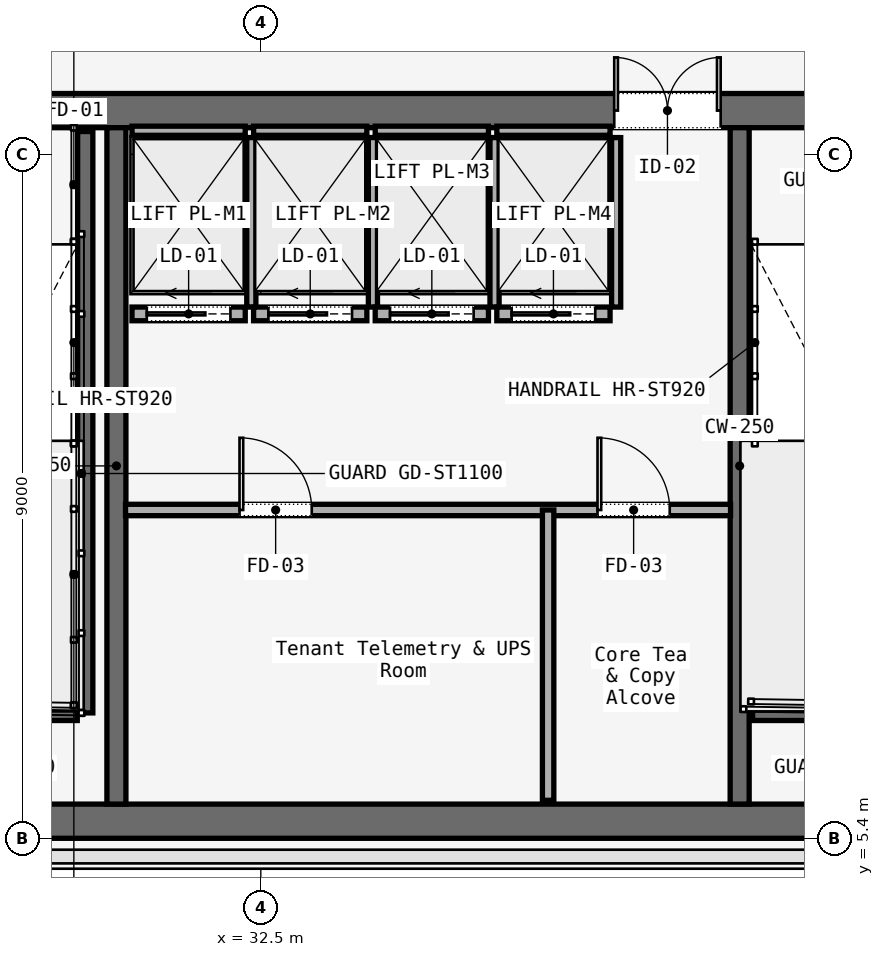
"""IFC4 building model, lengths in metres.
Left out: names, types, materials, properties, quantities, classifications, styles, units other than length and angle.
Written with IfcOpenShell. Run it as: python <this file> out.ifc"""

import sys

from ifc_helpers import new_model, si_unit, direction, frame, frame_2d, origin, place, context, subcontext, project, spatial, rectangle, extrude, element, fill, save


model = new_model("IFC4")
c1 = context("Model", 3, precision=1e-05, world=origin(), true_north=direction((0.0, 1.0)))
c2 = subcontext(c1, "Body", "Model", "MODEL_VIEW")
j1 = project(units=[si_unit("LENGTHUNIT", "METRE"), si_unit("PLANEANGLEUNIT", "RADIAN")], contexts=[c1])
p1 = place(None, origin())
s1 = spatial("IfcSite", under=j1, at=p1, CompositionType="ELEMENT")
p2 = place(p1, origin())
s2 = spatial("IfcBuilding", under=s1, at=p2, CompositionType="ELEMENT")
p3 = place(p2, frame((0.0, 0.0, 149.8)))
s3 = spatial("IfcBuildingStorey", under=s2, at=p3, CompositionType="ELEMENT", Elevation=149.8)
p4 = place(p3, frame((26.45, 14.975, 0.0), z_axis=(0.0, 0.0, 1.0), x_axis=(1.0, 0.0, 0.0)))
e1 = element("IfcWall", 1, at=p4, inside=s3, PredefinedType="SOLIDWALL", context=c2, shape_type="SweptSolid", body=[
    extrude(rectangle(XDim=31.1, YDim=0.45, at=frame_2d((15.55, 0.0))), origin(), (0.0, 0.0, 1.0), 3.58),
])
p5 = place(p4, frame((1.65, 0.0, 0.0)))
e2 = element("IfcOpeningElement", 2, at=p5, cuts=e1, PredefinedType="OPENING", context=c2, shape_type="SweptSolid", body=[
    extrude(rectangle(XDim=1.1, YDim=2.2, at=frame_2d((0.55, 1.1))), frame((0.0, 0.225, 0.0), z_axis=(0.0, -1.0, 0.0), x_axis=(1.0, 0.0, 0.0)), (0.0, 0.0, 1.0), 0.45),
])
p6 = place(p4, frame((13.65, 0.0, 0.0)))
e3 = element("IfcOpeningElement", 3, at=p6, cuts=e1, PredefinedType="OPENING", context=c2, shape_type="SweptSolid", body=[
    extrude(rectangle(XDim=1.1, YDim=2.2, at=frame_2d((0.55, 1.1))), frame((0.0, 0.225, 0.0), z_axis=(0.0, -1.0, 0.0), x_axis=(1.0, 0.0, 0.0)), (0.0, 0.0, 1.0), 0.45),
])
p7 = place(p4, frame((25.55, 0.0, 0.0)))
e4 = element("IfcOpeningElement", 4, at=p7, cuts=e1, PredefinedType="OPENING", context=c2, shape_type="SweptSolid", body=[
    extrude(rectangle(XDim=1.1, YDim=2.2, at=frame_2d((0.55, 1.1))), frame((0.0, 0.225, 0.0), z_axis=(0.0, -1.0, 0.0), x_axis=(1.0, 0.0, 0.0)), (0.0, 0.0, 1.0), 0.45),
])
p8 = place(p4, frame((10.7, 0.0, 0.0)))
e5 = element("IfcOpeningElement", 5, at=p8, cuts=e1, PredefinedType="OPENING", context=c2, shape_type="SweptSolid", body=[
    extrude(rectangle(XDim=1.4, YDim=2.2, at=frame_2d((0.7, 1.1))), frame((0.0, 0.225, 0.0), z_axis=(0.0, -1.0, 0.0), x_axis=(1.0, 0.0, 0.0)), (0.0, 0.0, 1.0), 0.45),
])
p9 = place(p4, frame((19.35, 0.0, 0.0)))
e6 = element("IfcOpeningElement", 6, at=p9, cuts=e1, PredefinedType="OPENING", context=c2, shape_type="SweptSolid", body=[
    extrude(rectangle(XDim=1.1, YDim=2.2, at=frame_2d((0.55, 1.1))), frame((0.0, 0.225, 0.0), z_axis=(0.0, -1.0, 0.0), x_axis=(1.0, 0.0, 0.0)), (0.0, 0.0, 1.0), 0.45),
])
p10 = place(p4, frame((21.4, 0.0, 0.0)))
e7 = element("IfcOpeningElement", 7, at=p10, cuts=e1, PredefinedType="OPENING", context=c2, shape_type="SweptSolid", body=[
    extrude(rectangle(XDim=0.9, YDim=2.1, at=frame_2d((0.45, 1.05))), frame((0.0, 0.225, 0.0), z_axis=(0.0, -1.0, 0.0), x_axis=(1.0, 0.0, 0.0)), (0.0, 0.0, 1.0), 0.45),
])
p11 = place(p4, frame((23.35, 0.0, 0.0)))
e8 = element("IfcOpeningElement", 8, at=p11, cuts=e1, PredefinedType="OPENING", context=c2, shape_type="SweptSolid", body=[
    extrude(rectangle(XDim=1.3, YDim=2.3, at=frame_2d((0.65, 1.15))), frame((0.0, 0.225, 0.0), z_axis=(0.0, -1.0, 0.0), x_axis=(1.0, 0.0, 0.0)), (0.0, 0.0, 1.0), 0.45),
])
p12 = place(p3, frame((26.45, 5.625, 0.0), z_axis=(0.0, 0.0, 1.0), x_axis=(1.0, 0.0, 0.0)))
e9 = element("IfcWall", 9, at=p12, inside=s3, PredefinedType="SOLIDWALL", context=c2, shape_type="SweptSolid", body=[
    extrude(rectangle(XDim=31.1, YDim=0.45, at=frame_2d((15.55, 0.0))), origin(), (0.0, 0.0, 1.0), 3.58),
])
for number, where, z_axis, x_axis in (
    (10, (30.6, 5.85, 0.0), (0.0, 0.0, 1.0), (0.0, 1.0, 0.0)),
    (11, (38.8, 5.85, 0.0), (0.0, 0.0, 1.0), (0.0, 1.0, 0.0)),
):
    element("IfcWall", number, at=place(p3, frame(where, z_axis=z_axis, x_axis=x_axis)), inside=s3, PredefinedType="SOLIDWALL", context=c2, shape_type="SweptSolid", body=[
        extrude(rectangle(XDim=8.9, YDim=0.25, at=frame_2d((4.45, 0.0))), origin(), (0.0, 0.0, 1.0), 3.58),
    ])
p13 = place(p3, frame((30.19, 14.7, 0.0), z_axis=(0.0, 0.0, 1.0), x_axis=(0.0, -1.0, 0.0)))
e12 = element("IfcWall", 12, at=p13, inside=s3, PredefinedType="SOLIDWALL", context=c2, shape_type="SweptSolid", body=[
    extrude(rectangle(XDim=7.65, YDim=0.2, at=frame_2d((3.825, 0.0))), origin(), (0.0, 0.0, 1.0), 3.8),
])
for number, where, z_axis, x_axis in (
    (13, (26.97, 7.05, 0.0), (0.0, 0.0, 1.0), (1.0, 0.0, 0.0)),
    (14, (38.97, 7.05, 0.0), (0.0, 0.0, 1.0), (1.0, 0.0, 0.0)),
):
    element("IfcWall", number, at=place(p3, frame(where, z_axis=z_axis, x_axis=x_axis)), inside=s3, PredefinedType="SOLIDWALL", context=c2, shape_type="SweptSolid", body=[
        extrude(rectangle(XDim=3.115, YDim=0.2, at=frame_2d((1.558, 0.0))), origin(), (0.0, 0.0, 1.0), 3.8),
    ])
p14 = place(p3, frame((30.72, 9.72, 0.0), z_axis=(0.0, 0.0, 1.0), x_axis=(1.0, 0.0, 0.0)))
e15 = element("IfcWall", 15, at=p14, inside=s3, PredefinedType="PARTITIONING", context=c2, shape_type="SweptSolid", body=[
    extrude(rectangle(XDim=7.96, YDim=0.15, at=frame_2d((3.98, 0.0))), origin(), (0.0, 0.0, 1.0), 3.01),
])
p15 = place(p14, frame((1.5, 0.0, 0.0)))
e16 = element("IfcOpeningElement", 16, at=p15, cuts=e15, PredefinedType="OPENING", context=c2, shape_type="SweptSolid", body=[
    extrude(rectangle(XDim=0.95, YDim=2.2, at=frame_2d((0.475, 1.1))), frame((0.0, 0.075, 0.0), z_axis=(0.0, -1.0, 0.0), x_axis=(1.0, 0.0, 0.0)), (0.0, 0.0, 1.0), 0.15),
])
p16 = place(p14, frame((6.21, 0.0, 0.0)))
e17 = element("IfcOpeningElement", 17, at=p16, cuts=e15, PredefinedType="OPENING", context=c2, shape_type="SweptSolid", body=[
    extrude(rectangle(XDim=0.95, YDim=2.2, at=frame_2d((0.475, 1.1))), frame((0.0, 0.075, 0.0), z_axis=(0.0, -1.0, 0.0), x_axis=(1.0, 0.0, 0.0)), (0.0, 0.0, 1.0), 0.15),
])
p17 = place(p3, frame((36.28, 5.9, 0.0), z_axis=(0.0, 0.0, 1.0), x_axis=(0.0, 1.0, 0.0)))
e18 = element("IfcWall", 18, at=p17, inside=s3, PredefinedType="PARTITIONING", context=c2, shape_type="SweptSolid", body=[
    extrude(rectangle(XDim=3.82, YDim=0.15, at=frame_2d((1.91, 0.0))), origin(), (0.0, 0.0, 1.0), 3.01),
])
p18 = place(p3, frame((30.805, 12.3, 0.0), z_axis=(0.0, 0.0, 1.0), x_axis=(1.0, 0.0, 0.0)))
e19 = element("IfcWall", 19, at=p18, inside=s3, PredefinedType="SOLIDWALL", context=c2, shape_type="SweptSolid", body=[
    extrude(rectangle(XDim=1.49, YDim=0.18, at=frame_2d((0.745, 0.0))), origin(), (0.0, 0.0, 1.0), 3.01),
])
p19 = place(p18, frame((0.195, 0.0, 0.0)))
e20 = element("IfcOpeningElement", 20, at=p19, cuts=e19, PredefinedType="OPENING", context=c2, shape_type="SweptSolid", body=[
    extrude(rectangle(XDim=1.1, YDim=2.2, at=frame_2d((0.55, 1.1))), frame((0.0, 0.09, 0.0), z_axis=(0.0, -1.0, 0.0), x_axis=(1.0, 0.0, 0.0)), (0.0, 0.0, 1.0), 0.18),
])
p20 = place(p3, frame((30.805, 14.71, 0.0), z_axis=(0.0, 0.0, 1.0), x_axis=(1.0, 0.0, 0.0)))
e21 = element("IfcWall", 21, at=p20, inside=s3, PredefinedType="SOLIDWALL", context=c2, shape_type="SweptSolid", body=[
    extrude(rectangle(XDim=1.49, YDim=0.12, at=frame_2d((0.745, 0.0))), origin(), (0.0, 0.0, 1.0), 3.01),
])
p21 = place(p3, frame((32.375, 12.39, 0.0), z_axis=(0.0, 0.0, 1.0), x_axis=(0.0, 1.0, 0.0)))
e22 = element("IfcWall", 22, at=p21, inside=s3, PredefinedType="SOLIDWALL", context=c2, shape_type="SweptSolid", body=[
    extrude(rectangle(XDim=2.23, YDim=0.12, at=frame_2d((1.115, 0.0))), origin(), (0.0, 0.0, 1.0), 3.01),
])
p22 = place(p3, frame((32.405, 12.3, 0.0), z_axis=(0.0, 0.0, 1.0), x_axis=(1.0, 0.0, 0.0)))
e23 = element("IfcWall", 23, at=p22, inside=s3, PredefinedType="SOLIDWALL", context=c2, shape_type="SweptSolid", body=[
    extrude(rectangle(XDim=1.49, YDim=0.18, at=frame_2d((0.745, 0.0))), origin(), (0.0, 0.0, 1.0), 3.01),
])
p23 = place(p22, frame((0.195, 0.0, 0.0)))
e24 = element("IfcOpeningElement", 24, at=p23, cuts=e23, PredefinedType="OPENING", context=c2, shape_type="SweptSolid", body=[
    extrude(rectangle(XDim=1.1, YDim=2.2, at=frame_2d((0.55, 1.1))), frame((0.0, 0.09, 0.0), z_axis=(0.0, -1.0, 0.0), x_axis=(1.0, 0.0, 0.0)), (0.0, 0.0, 1.0), 0.18),
])
p24 = place(p3, frame((32.405, 14.71, 0.0), z_axis=(0.0, 0.0, 1.0), x_axis=(1.0, 0.0, 0.0)))
e25 = element("IfcWall", 25, at=p24, inside=s3, PredefinedType="SOLIDWALL", context=c2, shape_type="SweptSolid", body=[
    extrude(rectangle(XDim=1.49, YDim=0.12, at=frame_2d((0.745, 0.0))), origin(), (0.0, 0.0, 1.0), 3.01),
])
p25 = place(p3, frame((33.975, 12.39, 0.0), z_axis=(0.0, 0.0, 1.0), x_axis=(0.0, 1.0, 0.0)))
e26 = element("IfcWall", 26, at=p25, inside=s3, PredefinedType="SOLIDWALL", context=c2, shape_type="SweptSolid", body=[
    extrude(rectangle(XDim=2.23, YDim=0.12, at=frame_2d((1.115, 0.0))), origin(), (0.0, 0.0, 1.0), 3.01),
])
p26 = place(p3, frame((34.005, 12.3, 0.0), z_axis=(0.0, 0.0, 1.0), x_axis=(1.0, 0.0, 0.0)))
e27 = element("IfcWall", 27, at=p26, inside=s3, PredefinedType="SOLIDWALL", context=c2, shape_type="SweptSolid", body=[
    extrude(rectangle(XDim=1.49, YDim=0.18, at=frame_2d((0.745, 0.0))), origin(), (0.0, 0.0, 1.0), 3.01),
])
p27 = place(p26, frame((0.195, 0.0, 0.0)))
e28 = element("IfcOpeningElement", 28, at=p27, cuts=e27, PredefinedType="OPENING", context=c2, shape_type="SweptSolid", body=[
    extrude(rectangle(XDim=1.1, YDim=2.2, at=frame_2d((0.55, 1.1))), frame((0.0, 0.09, 0.0), z_axis=(0.0, -1.0, 0.0), x_axis=(1.0, 0.0, 0.0)), (0.0, 0.0, 1.0), 0.18),
])
p28 = place(p3, frame((34.005, 14.71, 0.0), z_axis=(0.0, 0.0, 1.0), x_axis=(1.0, 0.0, 0.0)))
e29 = element("IfcWall", 29, at=p28, inside=s3, PredefinedType="SOLIDWALL", context=c2, shape_type="SweptSolid", body=[
    extrude(rectangle(XDim=1.49, YDim=0.12, at=frame_2d((0.745, 0.0))), origin(), (0.0, 0.0, 1.0), 3.01),
])
p29 = place(p3, frame((35.575, 12.39, 0.0), z_axis=(0.0, 0.0, 1.0), x_axis=(0.0, 1.0, 0.0)))
e30 = element("IfcWall", 30, at=p29, inside=s3, PredefinedType="SOLIDWALL", context=c2, shape_type="SweptSolid", body=[
    extrude(rectangle(XDim=2.23, YDim=0.12, at=frame_2d((1.115, 0.0))), origin(), (0.0, 0.0, 1.0), 3.01),
])
p30 = place(p3, frame((35.605, 12.3, 0.0), z_axis=(0.0, 0.0, 1.0), x_axis=(1.0, 0.0, 0.0)))
e31 = element("IfcWall", 31, at=p30, inside=s3, PredefinedType="SOLIDWALL", context=c2, shape_type="SweptSolid", body=[
    extrude(rectangle(XDim=1.49, YDim=0.18, at=frame_2d((0.745, 0.0))), origin(), (0.0, 0.0, 1.0), 3.01),
])
p31 = place(p30, frame((0.195, 0.0, 0.0)))
e32 = element("IfcOpeningElement", 32, at=p31, cuts=e31, PredefinedType="OPENING", context=c2, shape_type="SweptSolid", body=[
    extrude(rectangle(XDim=1.1, YDim=2.2, at=frame_2d((0.55, 1.1))), frame((0.0, 0.09, 0.0), z_axis=(0.0, -1.0, 0.0), x_axis=(1.0, 0.0, 0.0)), (0.0, 0.0, 1.0), 0.18),
])
p32 = place(p3, frame((35.605, 14.71, 0.0), z_axis=(0.0, 0.0, 1.0), x_axis=(1.0, 0.0, 0.0)))
e33 = element("IfcWall", 33, at=p32, inside=s3, PredefinedType="SOLIDWALL", context=c2, shape_type="SweptSolid", body=[
    extrude(rectangle(XDim=1.49, YDim=0.12, at=frame_2d((0.745, 0.0))), origin(), (0.0, 0.0, 1.0), 3.01),
])
p33 = place(p3, frame((37.175, 12.39, 0.0), z_axis=(0.0, 0.0, 1.0), x_axis=(0.0, 1.0, 0.0)))
e34 = element("IfcWall", 34, at=p33, inside=s3, PredefinedType="SOLIDWALL", context=c2, shape_type="SweptSolid", body=[
    extrude(rectangle(XDim=2.23, YDim=0.12, at=frame_2d((1.115, 0.0))), origin(), (0.0, 0.0, 1.0), 3.01),
])
p34 = place(p8, origin())
e35 = element("IfcDoor", 35, at=p34, inside=s3, OperationType="DOUBLE_DOOR_SINGLE_SWING", PredefinedType="DOOR", context=c2, shape_type="SweptSolid", body=[
    extrude(rectangle(XDim=1.4, YDim=2.2, at=frame_2d((0.7, 1.1))), frame((0.0, 0.025, 0.0), z_axis=(0.0, -1.0, 0.0), x_axis=(1.0, 0.0, 0.0)), (0.0, 0.0, 1.0), 0.05),
])
fill(e5, e35)
p35 = place(p15, origin())
e36 = element("IfcDoor", 36, at=p35, inside=s3, OperationType="SINGLE_SWING_LEFT", PredefinedType="DOOR", context=c2, shape_type="SweptSolid", body=[
    extrude(rectangle(XDim=0.95, YDim=2.2, at=frame_2d((0.475, 1.1))), frame((0.0, 0.025, 0.0), z_axis=(0.0, -1.0, 0.0), x_axis=(1.0, 0.0, 0.0)), (0.0, 0.0, 1.0), 0.05),
])
fill(e16, e36)
p36 = place(p16, origin())
e37 = element("IfcDoor", 37, at=p36, inside=s3, OperationType="SINGLE_SWING_RIGHT", PredefinedType="DOOR", context=c2, shape_type="SweptSolid", body=[
    extrude(rectangle(XDim=0.95, YDim=2.2, at=frame_2d((0.475, 1.1))), frame((0.0, 0.025, 0.0), z_axis=(0.0, -1.0, 0.0), x_axis=(1.0, 0.0, 0.0)), (0.0, 0.0, 1.0), 0.05),
])
fill(e17, e37)
p37 = place(p19, origin())
e38 = element("IfcDoor", 38, at=p37, inside=s3, OperationType="SLIDING_TO_LEFT", PredefinedType="DOOR", context=c2, shape_type="SweptSolid", body=[
    extrude(rectangle(XDim=1.1, YDim=2.2, at=frame_2d((0.55, 1.1))), frame((0.0, 0.025, 0.0), z_axis=(0.0, -1.0, 0.0), x_axis=(1.0, 0.0, 0.0)), (0.0, 0.0, 1.0), 0.05),
])
fill(e20, e38)
p38 = place(p23, origin())
e39 = element("IfcDoor", 39, at=p38, inside=s3, OperationType="SLIDING_TO_LEFT", PredefinedType="DOOR", context=c2, shape_type="SweptSolid", body=[
    extrude(rectangle(XDim=1.1, YDim=2.2, at=frame_2d((0.55, 1.1))), frame((0.0, 0.025, 0.0), z_axis=(0.0, -1.0, 0.0), x_axis=(1.0, 0.0, 0.0)), (0.0, 0.0, 1.0), 0.05),
])
fill(e24, e39)
p39 = place(p27, origin())
e40 = element("IfcDoor", 40, at=p39, inside=s3, OperationType="SLIDING_TO_LEFT", PredefinedType="DOOR", context=c2, shape_type="SweptSolid", body=[
    extrude(rectangle(XDim=1.1, YDim=2.2, at=frame_2d((0.55, 1.1))), frame((0.0, 0.025, 0.0), z_axis=(0.0, -1.0, 0.0), x_axis=(1.0, 0.0, 0.0)), (0.0, 0.0, 1.0), 0.05),
])
fill(e28, e40)
p40 = place(p31, origin())
e41 = element("IfcDoor", 41, at=p40, inside=s3, OperationType="SLIDING_TO_LEFT", PredefinedType="DOOR", context=c2, shape_type="SweptSolid", body=[
    extrude(rectangle(XDim=1.1, YDim=2.2, at=frame_2d((0.55, 1.1))), frame((0.0, 0.025, 0.0), z_axis=(0.0, -1.0, 0.0), x_axis=(1.0, 0.0, 0.0)), (0.0, 0.0, 1.0), 0.05),
])
fill(e32, e41)
save(model, sys.argv[1])
